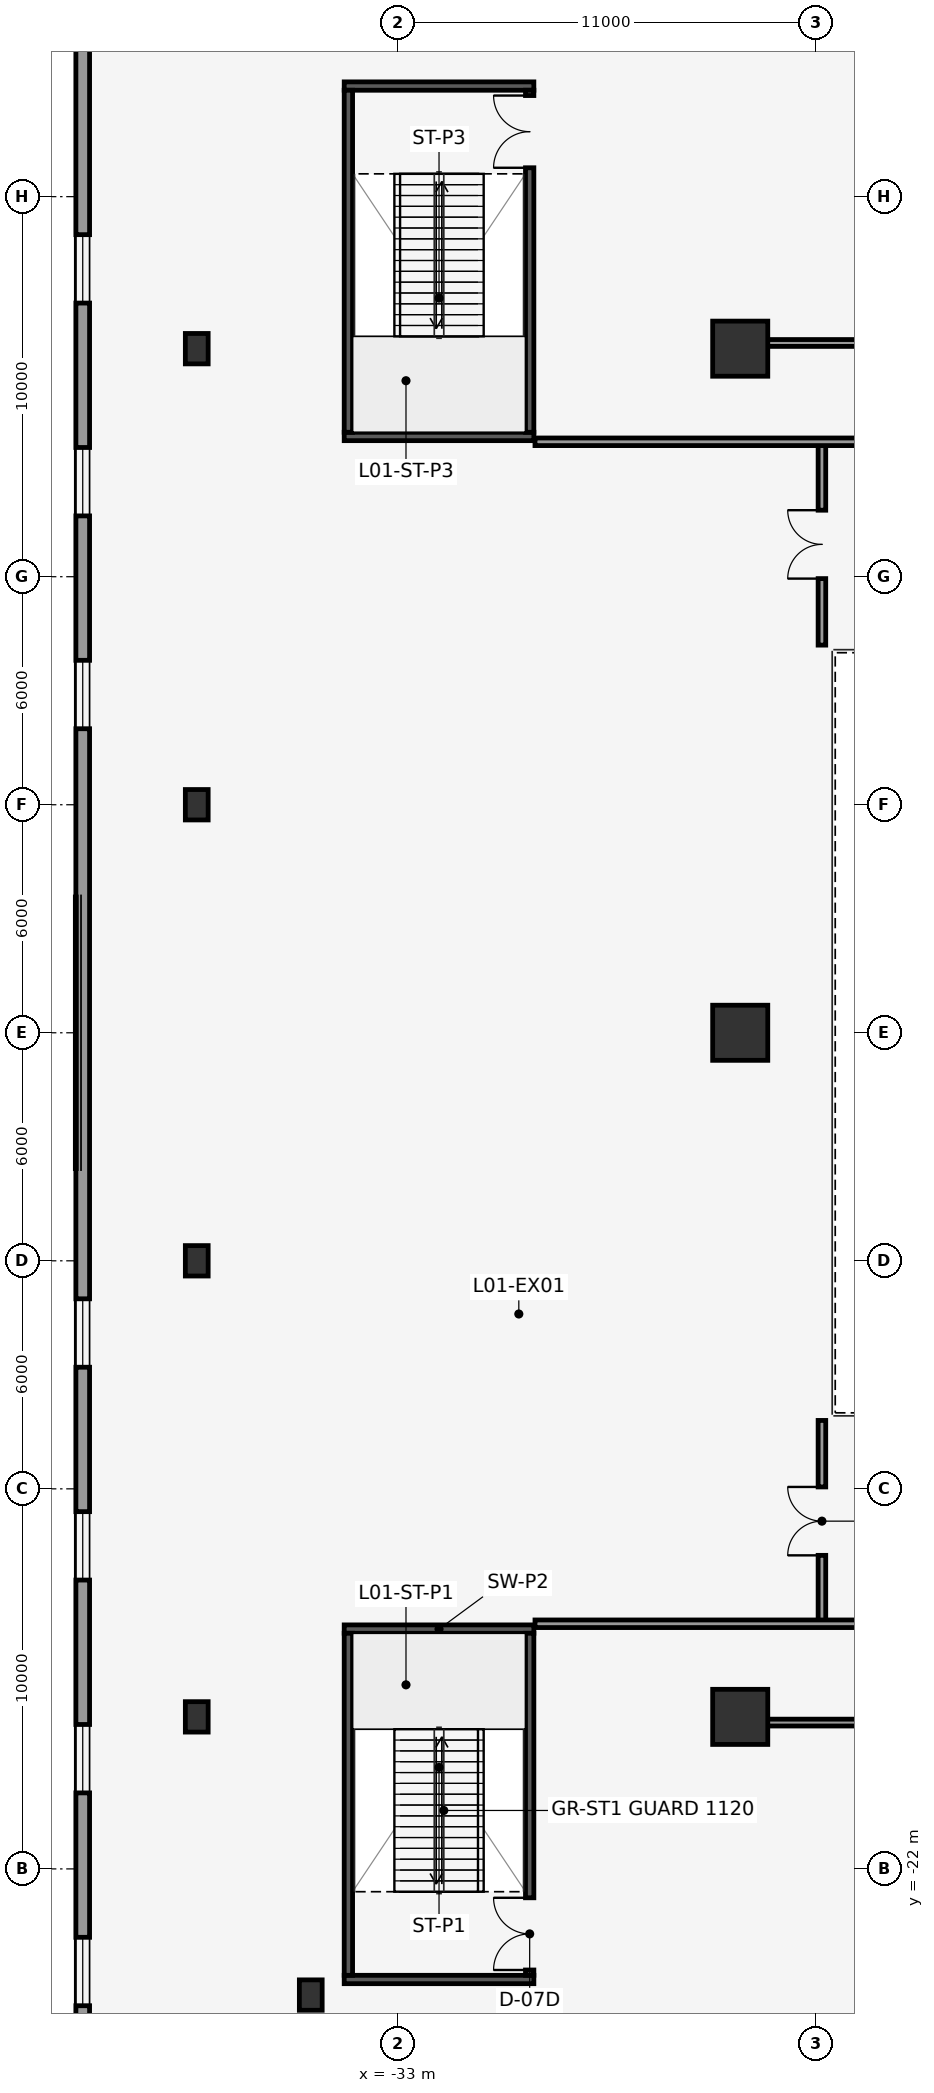
"""IFC4 building model, lengths in metres.
Left out: names, types, materials, properties, quantities, classifications, styles, units other than length and angle.
Written with IfcOpenShell. Run it as: python <this file> out.ifc"""

import sys

from ifc_helpers import new_model, si_unit, direction, frame, frame_2d, origin, origin_2d, place, context, subcontext, project, spatial, rectangle, hollow_rectangle, extrude, element, fill, save


model = new_model("IFC4")
c1 = context("Model", 3, precision=1e-05, world=origin(), true_north=direction((0.0, 1.0)))
c2 = subcontext(c1, "Body", "Model", "MODEL_VIEW")
j1 = project(units=[si_unit("LENGTHUNIT", "METRE"), si_unit("PLANEANGLEUNIT", "RADIAN")], contexts=[c1])
p1 = place(None, origin())
s1 = spatial("IfcSite", under=j1, at=p1, CompositionType="ELEMENT")
p2 = place(p1, origin())
s2 = spatial("IfcBuilding", under=s1, at=p2, CompositionType="ELEMENT")
p3 = place(p2, frame((0.0, 0.0, 6.0)))
s3 = spatial("IfcBuildingStorey", under=s2, at=p3, CompositionType="ELEMENT", Elevation=6.0)
for number, where, z_axis, x_axis in (
    (1, (-24.0, -18.0, 0.0), (0.0, 0.0, 1.0), (1.0, 0.0, 0.0)),
    (2, (-24.0, 0.0, 0.0), (0.0, 0.0, 1.0), (1.0, 0.0, 0.0)),
    (3, (-24.0, 18.0, 0.0), (0.0, 0.0, 1.0), (1.0, 0.0, 0.0)),
):
    element("IfcColumn", number, at=place(p3, frame(where, z_axis=z_axis, x_axis=x_axis)), inside=s3, PredefinedType="COLUMN", context=c2, shape_type="SweptSolid", body=[
        extrude(rectangle(XDim=1.45, YDim=1.45, at=origin_2d()), origin(), (0.0, 0.0, 1.0), 5.5),
    ])
for number, where, z_axis, x_axis in (
    (4, (-38.3, -18.0, 0.0), (0.0, 0.0, 1.0), (1.0, 0.0, 0.0)),
    (5, (-38.3, -6.0, 0.0), (0.0, 0.0, 1.0), (1.0, 0.0, 0.0)),
    (6, (-38.3, 6.0, 0.0), (0.0, 0.0, 1.0), (1.0, 0.0, 0.0)),
    (7, (-38.3, 18.0, 0.0), (0.0, 0.0, 1.0), (1.0, 0.0, 0.0)),
    (8, (-35.3, -25.32, 0.0), (0.0, 0.0, 1.0), (1.0, 0.0, 0.0)),
):
    element("IfcColumn", number, at=place(p3, frame(where, z_axis=z_axis, x_axis=x_axis)), inside=s3, PredefinedType="COLUMN", context=c2, shape_type="SweptSolid", body=[
        extrude(hollow_rectangle(XDim=0.6, YDim=0.8, WallThickness=0.05, at=origin_2d()), origin(), (0.0, 0.0, 1.0), 5.5),
    ])
p4 = place(p3, frame((-41.3, -30.3, 0.0), z_axis=(0.0, 0.0, 1.0), x_axis=(0.0, 1.0, 0.0)))
e9 = element("IfcWall", 9, at=p4, inside=s3, PredefinedType="STANDARD", context=c2, shape_type="SweptSolid", body=[
    extrude(rectangle(XDim=60.6, YDim=0.36, at=frame_2d((30.3, 0.0))), origin(), (0.0, 0.0, 1.0), 5.2),
])
p5 = place(p4, frame((4.7, 0.0, 0.9)))
e10 = element("IfcOpeningElement", 10, at=p5, cuts=e9, PredefinedType="OPENING", context=c2, shape_type="SweptSolid", body=[
    extrude(rectangle(XDim=1.8, YDim=2.6, at=frame_2d((0.9, 1.3))), frame((0.0, 0.19, 0.0), z_axis=(0.0, -1.0, 0.0), x_axis=(1.0, 0.0, 0.0)), (0.0, 0.0, 1.0), 0.38),
])
p6 = place(p4, frame((10.3, 0.0, 0.9)))
e11 = element("IfcOpeningElement", 11, at=p6, cuts=e9, PredefinedType="OPENING", context=c2, shape_type="SweptSolid", body=[
    extrude(rectangle(XDim=1.8, YDim=2.6, at=frame_2d((0.9, 1.3))), frame((0.0, 0.19, 0.0), z_axis=(0.0, -1.0, 0.0), x_axis=(1.0, 0.0, 0.0)), (0.0, 0.0, 1.0), 0.38),
])
p7 = place(p4, frame((15.9, 0.0, 0.9)))
e12 = element("IfcOpeningElement", 12, at=p7, cuts=e9, PredefinedType="OPENING", context=c2, shape_type="SweptSolid", body=[
    extrude(rectangle(XDim=1.8, YDim=2.6, at=frame_2d((0.9, 1.3))), frame((0.0, 0.19, 0.0), z_axis=(0.0, -1.0, 0.0), x_axis=(1.0, 0.0, 0.0)), (0.0, 0.0, 1.0), 0.38),
])
p8 = place(p4, frame((21.5, 0.0, 0.9)))
e13 = element("IfcOpeningElement", 13, at=p8, cuts=e9, PredefinedType="OPENING", context=c2, shape_type="SweptSolid", body=[
    extrude(rectangle(XDim=1.8, YDim=2.6, at=frame_2d((0.9, 1.3))), frame((0.0, 0.19, 0.0), z_axis=(0.0, -1.0, 0.0), x_axis=(1.0, 0.0, 0.0)), (0.0, 0.0, 1.0), 0.38),
])
p9 = place(p4, frame((38.3, 0.0, 0.9)))
e14 = element("IfcOpeningElement", 14, at=p9, cuts=e9, PredefinedType="OPENING", context=c2, shape_type="SweptSolid", body=[
    extrude(rectangle(XDim=1.8, YDim=2.6, at=frame_2d((0.9, 1.3))), frame((0.0, 0.19, 0.0), z_axis=(0.0, -1.0, 0.0), x_axis=(1.0, 0.0, 0.0)), (0.0, 0.0, 1.0), 0.38),
])
p10 = place(p4, frame((43.9, 0.0, 0.9)))
e15 = element("IfcOpeningElement", 15, at=p10, cuts=e9, PredefinedType="OPENING", context=c2, shape_type="SweptSolid", body=[
    extrude(rectangle(XDim=1.8, YDim=2.6, at=frame_2d((0.9, 1.3))), frame((0.0, 0.19, 0.0), z_axis=(0.0, -1.0, 0.0), x_axis=(1.0, 0.0, 0.0)), (0.0, 0.0, 1.0), 0.38),
])
p11 = place(p4, frame((49.5, 0.0, 0.9)))
e16 = element("IfcOpeningElement", 16, at=p11, cuts=e9, PredefinedType="OPENING", context=c2, shape_type="SweptSolid", body=[
    extrude(rectangle(XDim=1.8, YDim=2.6, at=frame_2d((0.9, 1.3))), frame((0.0, 0.19, 0.0), z_axis=(0.0, -1.0, 0.0), x_axis=(1.0, 0.0, 0.0)), (0.0, 0.0, 1.0), 0.38),
])
for number, where, z_axis, x_axis in (
    (17, (-34.42, -24.91, 0.0), (0.0, 0.0, 1.0), (1.0, 0.0, 0.0)),
    (18, (-34.42, -15.69, 0.0), (0.0, 0.0, 1.0), (1.0, 0.0, 0.0)),
):
    element("IfcWall", number, at=place(p3, frame(where, z_axis=z_axis, x_axis=x_axis)), inside=s3, PredefinedType="SHEAR", context=c2, shape_type="SweptSolid", body=[
        extrude(rectangle(XDim=4.99, YDim=0.22, at=frame_2d((2.495, 0.0))), origin(), (0.0, 0.0, 1.0), 5.2),
    ])
p12 = place(p3, frame((-34.31, -24.8, 0.0), z_axis=(0.0, 0.0, 1.0), x_axis=(0.0, 1.0, 0.0)))
e19 = element("IfcWall", 19, at=p12, inside=s3, PredefinedType="SHEAR", context=c2, shape_type="SweptSolid", body=[
    extrude(rectangle(XDim=9.0, YDim=0.22, at=frame_2d((4.5, 0.0))), origin(), (0.0, 0.0, 1.0), 5.2),
])
p13 = place(p3, frame((-29.54, -24.8, 0.0), z_axis=(0.0, 0.0, 1.0), x_axis=(0.0, 1.0, 0.0)))
e20 = element("IfcWall", 20, at=p13, inside=s3, PredefinedType="SHEAR", context=c2, shape_type="SweptSolid", body=[
    extrude(rectangle(XDim=9.0, YDim=0.22, at=frame_2d((4.5, 0.0))), origin(), (0.0, 0.0, 1.0), 5.2),
])
p14 = place(p13, frame((0.14, 0.0, 0.0)))
e21 = element("IfcOpeningElement", 21, at=p14, cuts=e20, PredefinedType="OPENING", context=c2, shape_type="SweptSolid", body=[
    extrude(rectangle(XDim=1.9, YDim=2.2, at=frame_2d((0.95, 1.1))), frame((0.0, 0.12, 0.0), z_axis=(0.0, -1.0, 0.0), x_axis=(1.0, 0.0, 0.0)), (0.0, 0.0, 1.0), 0.24),
])
for number, where, z_axis, x_axis in (
    (22, (-34.42, 15.69, 0.0), (0.0, 0.0, 1.0), (1.0, 0.0, 0.0)),
    (23, (-34.42, 24.91, 0.0), (0.0, 0.0, 1.0), (1.0, 0.0, 0.0)),
):
    element("IfcWall", number, at=place(p3, frame(where, z_axis=z_axis, x_axis=x_axis)), inside=s3, PredefinedType="SHEAR", context=c2, shape_type="SweptSolid", body=[
        extrude(rectangle(XDim=4.99, YDim=0.22, at=frame_2d((2.495, 0.0))), origin(), (0.0, 0.0, 1.0), 5.2),
    ])
p15 = place(p3, frame((-34.31, 15.8, 0.0), z_axis=(0.0, 0.0, 1.0), x_axis=(0.0, 1.0, 0.0)))
e24 = element("IfcWall", 24, at=p15, inside=s3, PredefinedType="SHEAR", context=c2, shape_type="SweptSolid", body=[
    extrude(rectangle(XDim=9.0, YDim=0.22, at=frame_2d((4.5, 0.0))), origin(), (0.0, 0.0, 1.0), 5.2),
])
p16 = place(p3, frame((-29.54, 15.8, 0.0), z_axis=(0.0, 0.0, 1.0), x_axis=(0.0, 1.0, 0.0)))
e25 = element("IfcWall", 25, at=p16, inside=s3, PredefinedType="SHEAR", context=c2, shape_type="SweptSolid", body=[
    extrude(rectangle(XDim=9.0, YDim=0.22, at=frame_2d((4.5, 0.0))), origin(), (0.0, 0.0, 1.0), 5.2),
])
p17 = place(p16, frame((6.96, 0.0, 0.0)))
e26 = element("IfcOpeningElement", 26, at=p17, cuts=e25, PredefinedType="OPENING", context=c2, shape_type="SweptSolid", body=[
    extrude(rectangle(XDim=1.9, YDim=2.2, at=frame_2d((0.95, 1.1))), frame((0.0, 0.12, 0.0), z_axis=(0.0, -1.0, 0.0), x_axis=(1.0, 0.0, 0.0)), (0.0, 0.0, 1.0), 0.24),
])
p18 = place(p3, frame((-21.85, -15.5, 0.0), z_axis=(0.0, 0.0, 1.0), x_axis=(0.0, 1.0, 0.0)))
e27 = element("IfcWall", 27, at=p18, inside=s3, PredefinedType="PARTITIONING", context=c2, shape_type="SweptSolid", body=[
    extrude(rectangle(XDim=5.3, YDim=0.2, at=frame_2d((2.65, 0.0))), origin(), (0.0, 0.0, 1.0), 5.2),
])
p19 = place(p18, frame((1.75, 0.0, 0.0)))
e28 = element("IfcOpeningElement", 28, at=p19, cuts=e27, PredefinedType="OPENING", context=c2, shape_type="SweptSolid", body=[
    extrude(rectangle(XDim=1.8, YDim=2.2, at=frame_2d((0.9, 1.1))), frame((0.0, 0.11, 0.0), z_axis=(0.0, -1.0, 0.0), x_axis=(1.0, 0.0, 0.0)), (0.0, 0.0, 1.0), 0.22),
])
p20 = place(p3, frame((-21.85, 10.2, 0.0), z_axis=(0.0, 0.0, 1.0), x_axis=(0.0, 1.0, 0.0)))
e29 = element("IfcWall", 29, at=p20, inside=s3, PredefinedType="PARTITIONING", context=c2, shape_type="SweptSolid", body=[
    extrude(rectangle(XDim=5.3, YDim=0.2, at=frame_2d((2.65, 0.0))), origin(), (0.0, 0.0, 1.0), 5.2),
])
p21 = place(p20, frame((1.75, 0.0, 0.0)))
e30 = element("IfcOpeningElement", 30, at=p21, cuts=e29, PredefinedType="OPENING", context=c2, shape_type="SweptSolid", body=[
    extrude(rectangle(XDim=1.8, YDim=2.2, at=frame_2d((0.9, 1.1))), frame((0.0, 0.11, 0.0), z_axis=(0.0, -1.0, 0.0), x_axis=(1.0, 0.0, 0.0)), (0.0, 0.0, 1.0), 0.22),
])
p22 = place(p3, frame((-29.4, 15.55, 0.0), z_axis=(0.0, 0.0, 1.0), x_axis=(1.0, 0.0, 0.0)))
e31 = element("IfcWall", 31, at=p22, inside=s3, PredefinedType="PARTITIONING", context=c2, shape_type="SweptSolid", body=[
    extrude(rectangle(XDim=18.75, YDim=0.2, at=frame_2d((9.375, 0.0))), origin(), (0.0, 0.0, 1.0), 5.2),
])
p23 = place(p22, frame((8.475, 0.0, 0.0)))
e32 = element("IfcOpeningElement", 32, at=p23, cuts=e31, PredefinedType="OPENING", context=c2, shape_type="SweptSolid", body=[
    extrude(rectangle(XDim=1.8, YDim=2.2, at=frame_2d((0.9, 1.1))), frame((0.0, 0.11, 0.0), z_axis=(0.0, -1.0, 0.0), x_axis=(1.0, 0.0, 0.0)), (0.0, 0.0, 1.0), 0.22),
])
p24 = place(p3, frame((-29.4, -15.55, 0.0), z_axis=(0.0, 0.0, 1.0), x_axis=(1.0, 0.0, 0.0)))
e33 = element("IfcWall", 33, at=p24, inside=s3, PredefinedType="PARTITIONING", context=c2, shape_type="SweptSolid", body=[
    extrude(rectangle(XDim=18.75, YDim=0.2, at=frame_2d((9.375, 0.0))), origin(), (0.0, 0.0, 1.0), 5.2),
])
p25 = place(p24, frame((8.475, 0.0, 0.0)))
e34 = element("IfcOpeningElement", 34, at=p25, cuts=e33, PredefinedType="OPENING", context=c2, shape_type="SweptSolid", body=[
    extrude(rectangle(XDim=1.8, YDim=2.2, at=frame_2d((0.9, 1.1))), frame((0.0, 0.11, 0.0), z_axis=(0.0, -1.0, 0.0), x_axis=(1.0, 0.0, 0.0)), (0.0, 0.0, 1.0), 0.22),
])
p26 = place(p3, frame((-23.6, 18.15, 0.0), z_axis=(0.0, 0.0, 1.0), x_axis=(1.0, 0.0, 0.0)))
e35 = element("IfcWall", 35, at=p26, inside=s3, PredefinedType="PARTITIONING", context=c2, shape_type="SweptSolid", body=[
    extrude(rectangle(XDim=37.75, YDim=0.18, at=frame_2d((18.875, 0.0))), origin(), (0.0, 0.0, 1.0), 3.38),
])
p27 = place(p26, frame((10.425, 0.0, 0.0)))
e36 = element("IfcOpeningElement", 36, at=p27, cuts=e35, PredefinedType="OPENING", context=c2, shape_type="SweptSolid", body=[
    extrude(rectangle(XDim=1.8, YDim=2.2, at=frame_2d((0.9, 1.1))), frame((0.0, 0.1, 0.0), z_axis=(0.0, -1.0, 0.0), x_axis=(1.0, 0.0, 0.0)), (0.0, 0.0, 1.0), 0.2),
])
p28 = place(p3, frame((-23.6, -18.15, 0.0), z_axis=(0.0, 0.0, 1.0), x_axis=(1.0, 0.0, 0.0)))
e37 = element("IfcWall", 37, at=p28, inside=s3, PredefinedType="PARTITIONING", context=c2, shape_type="SweptSolid", body=[
    extrude(rectangle(XDim=47.2, YDim=0.18, at=frame_2d((23.6, 0.0))), origin(), (0.0, 0.0, 1.0), 3.38),
])
p29 = place(p28, frame((13.26, 0.0, 0.0)))
e38 = element("IfcOpeningElement", 38, at=p29, cuts=e37, PredefinedType="OPENING", context=c2, shape_type="SweptSolid", body=[
    extrude(rectangle(XDim=1.8, YDim=2.2, at=frame_2d((0.9, 1.1))), frame((0.0, 0.1, 0.0), z_axis=(0.0, -1.0, 0.0), x_axis=(1.0, 0.0, 0.0)), (0.0, 0.0, 1.0), 0.2),
])
p30 = place(p5, origin())
e39 = element("IfcWindow", 39, at=p30, inside=s3, PartitioningType="DOUBLE_PANEL_VERTICAL", PredefinedType="WINDOW", context=c2, shape_type="SweptSolid", body=[
    extrude(rectangle(XDim=1.8, YDim=2.6, at=frame_2d((0.9, 1.3))), frame((0.0, 0.03, 0.0), z_axis=(0.0, -1.0, 0.0), x_axis=(1.0, 0.0, 0.0)), (0.0, 0.0, 1.0), 0.06),
])
fill(e10, e39)
p31 = place(p6, origin())
e40 = element("IfcWindow", 40, at=p31, inside=s3, PartitioningType="DOUBLE_PANEL_VERTICAL", PredefinedType="WINDOW", context=c2, shape_type="SweptSolid", body=[
    extrude(rectangle(XDim=1.8, YDim=2.6, at=frame_2d((0.9, 1.3))), frame((0.0, 0.03, 0.0), z_axis=(0.0, -1.0, 0.0), x_axis=(1.0, 0.0, 0.0)), (0.0, 0.0, 1.0), 0.06),
])
fill(e11, e40)
p32 = place(p7, origin())
e41 = element("IfcWindow", 41, at=p32, inside=s3, PartitioningType="DOUBLE_PANEL_VERTICAL", PredefinedType="WINDOW", context=c2, shape_type="SweptSolid", body=[
    extrude(rectangle(XDim=1.8, YDim=2.6, at=frame_2d((0.9, 1.3))), frame((0.0, 0.03, 0.0), z_axis=(0.0, -1.0, 0.0), x_axis=(1.0, 0.0, 0.0)), (0.0, 0.0, 1.0), 0.06),
])
fill(e12, e41)
p33 = place(p8, origin())
e42 = element("IfcWindow", 42, at=p33, inside=s3, PartitioningType="DOUBLE_PANEL_VERTICAL", PredefinedType="WINDOW", context=c2, shape_type="SweptSolid", body=[
    extrude(rectangle(XDim=1.8, YDim=2.6, at=frame_2d((0.9, 1.3))), frame((0.0, 0.03, 0.0), z_axis=(0.0, -1.0, 0.0), x_axis=(1.0, 0.0, 0.0)), (0.0, 0.0, 1.0), 0.06),
])
fill(e13, e42)
p34 = place(p9, origin())
e43 = element("IfcWindow", 43, at=p34, inside=s3, PartitioningType="DOUBLE_PANEL_VERTICAL", PredefinedType="WINDOW", context=c2, shape_type="SweptSolid", body=[
    extrude(rectangle(XDim=1.8, YDim=2.6, at=frame_2d((0.9, 1.3))), frame((0.0, 0.03, 0.0), z_axis=(0.0, -1.0, 0.0), x_axis=(1.0, 0.0, 0.0)), (0.0, 0.0, 1.0), 0.06),
])
fill(e14, e43)
p35 = place(p10, origin())
e44 = element("IfcWindow", 44, at=p35, inside=s3, PartitioningType="DOUBLE_PANEL_VERTICAL", PredefinedType="WINDOW", context=c2, shape_type="SweptSolid", body=[
    extrude(rectangle(XDim=1.8, YDim=2.6, at=frame_2d((0.9, 1.3))), frame((0.0, 0.03, 0.0), z_axis=(0.0, -1.0, 0.0), x_axis=(1.0, 0.0, 0.0)), (0.0, 0.0, 1.0), 0.06),
])
fill(e15, e44)
p36 = place(p11, origin())
e45 = element("IfcWindow", 45, at=p36, inside=s3, PartitioningType="DOUBLE_PANEL_VERTICAL", PredefinedType="WINDOW", context=c2, shape_type="SweptSolid", body=[
    extrude(rectangle(XDim=1.8, YDim=2.6, at=frame_2d((0.9, 1.3))), frame((0.0, 0.03, 0.0), z_axis=(0.0, -1.0, 0.0), x_axis=(1.0, 0.0, 0.0)), (0.0, 0.0, 1.0), 0.06),
])
fill(e16, e45)
p37 = place(p14, origin())
e46 = element("IfcDoor", 46, at=p37, inside=s3, OperationType="DOUBLE_DOOR_SINGLE_SWING", PredefinedType="DOOR", context=c2, shape_type="SweptSolid", body=[
    extrude(rectangle(XDim=1.9, YDim=2.2, at=frame_2d((0.95, 1.1))), frame((0.0, 0.025, 0.0), z_axis=(0.0, -1.0, 0.0), x_axis=(1.0, 0.0, 0.0)), (0.0, 0.0, 1.0), 0.05),
])
fill(e21, e46)
p38 = place(p17, origin())
e47 = element("IfcDoor", 47, at=p38, inside=s3, OperationType="DOUBLE_DOOR_SINGLE_SWING", PredefinedType="DOOR", context=c2, shape_type="SweptSolid", body=[
    extrude(rectangle(XDim=1.9, YDim=2.2, at=frame_2d((0.95, 1.1))), frame((0.0, 0.025, 0.0), z_axis=(0.0, -1.0, 0.0), x_axis=(1.0, 0.0, 0.0)), (0.0, 0.0, 1.0), 0.05),
])
fill(e26, e47)
p39 = place(p19, origin())
e48 = element("IfcDoor", 48, at=p39, inside=s3, OperationType="DOUBLE_DOOR_SINGLE_SWING", PredefinedType="DOOR", context=c2, shape_type="SweptSolid", body=[
    extrude(rectangle(XDim=1.8, YDim=2.2, at=frame_2d((0.9, 1.1))), frame((0.0, 0.025, 0.0), z_axis=(0.0, -1.0, 0.0), x_axis=(1.0, 0.0, 0.0)), (0.0, 0.0, 1.0), 0.05),
])
fill(e28, e48)
p40 = place(p21, origin())
e49 = element("IfcDoor", 49, at=p40, inside=s3, OperationType="DOUBLE_DOOR_SINGLE_SWING", PredefinedType="DOOR", context=c2, shape_type="SweptSolid", body=[
    extrude(rectangle(XDim=1.8, YDim=2.2, at=frame_2d((0.9, 1.1))), frame((0.0, 0.025, 0.0), z_axis=(0.0, -1.0, 0.0), x_axis=(1.0, 0.0, 0.0)), (0.0, 0.0, 1.0), 0.05),
])
fill(e30, e49)
save(model, sys.argv[1])
